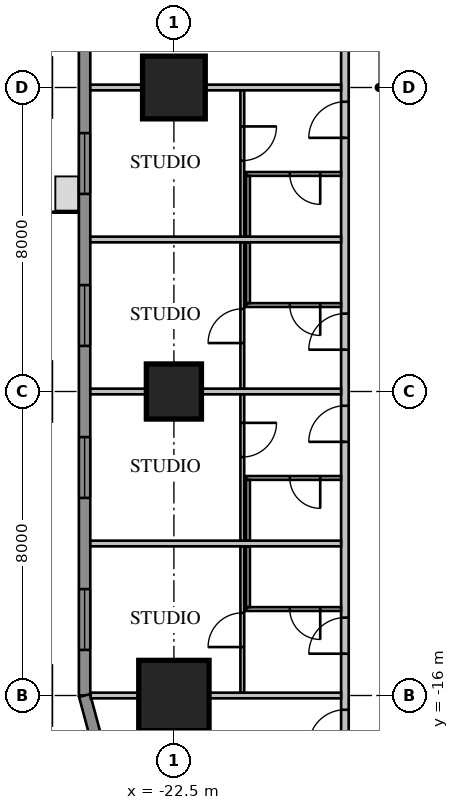
"""IFC4 building model, lengths in metres.
Left out: names, types, materials, properties, quantities, classifications, styles, units other than length and angle.
Written with IfcOpenShell. Run it as: python <this file> out.ifc"""

import sys

from ifc_helpers import new_model, si_unit, direction, frame, frame_2d, origin, origin_2d, place, context, subcontext, project, spatial, rectangle, extrude, element, fill, save


model = new_model("IFC4")
c1 = context("Model", 3, precision=1e-05, world=origin(), true_north=direction((0.0, 1.0)))
c2 = subcontext(c1, "Body", "Model", "MODEL_VIEW")
j1 = project(units=[si_unit("LENGTHUNIT", "METRE"), si_unit("PLANEANGLEUNIT", "RADIAN")], contexts=[c1])
p1 = place(None, origin())
s1 = spatial("IfcSite", under=j1, at=p1, CompositionType="ELEMENT")
p2 = place(p1, origin())
s2 = spatial("IfcBuilding", under=s1, at=p2, CompositionType="ELEMENT")
p3 = place(p2, frame((0.0, 0.0, 42.95)))
s3 = spatial("IfcBuildingStorey", under=s2, at=p3, CompositionType="ELEMENT", Elevation=42.95)
p4 = place(p3, frame((-22.5, 0.0, 0.0), z_axis=(0.0, 0.0, 1.0), x_axis=(1.0, 0.0, 0.0)))
e1 = element("IfcColumn", 1, at=p4, inside=s3, PredefinedType="COLUMN", context=c2, shape_type="SweptSolid", body=[
    extrude(rectangle(XDim=1.65, YDim=1.65, at=origin_2d()), origin(), (0.0, 0.0, 1.0), 3.85),
])
p5 = place(p3, frame((-22.5, -8.0, 0.0), z_axis=(0.0, 0.0, 1.0), x_axis=(1.0, 0.0, 0.0)))
e2 = element("IfcColumn", 2, at=p5, inside=s3, PredefinedType="COLUMN", context=c2, shape_type="SweptSolid", body=[
    extrude(rectangle(XDim=1.45, YDim=1.45, at=origin_2d()), origin(), (0.0, 0.0, 1.0), 3.85),
])
p6 = place(p3, frame((-22.5, -16.0, 0.0), z_axis=(0.0, 0.0, 1.0), x_axis=(1.0, 0.0, 0.0)))
e3 = element("IfcColumn", 3, at=p6, inside=s3, PredefinedType="COLUMN", context=c2, shape_type="SweptSolid", body=[
    extrude(rectangle(XDim=1.85, YDim=1.85, at=origin_2d()), origin(), (0.0, 0.0, 1.0), 3.85),
])
p7 = place(p3, frame((-24.85, 16.0, 0.0), z_axis=(0.0, 0.0, 1.0), x_axis=(0.0, -1.0, 0.0)))
e4 = element("IfcWall", 4, at=p7, inside=s3, PredefinedType="SOLIDWALL", context=c2, shape_type="SweptSolid", body=[
    extrude(rectangle(XDim=32.0, YDim=0.3, at=frame_2d((16.0, 0.0))), origin(), (0.0, 0.0, 1.0), 3.65),
])
p8 = place(p7, frame((1.2, 0.0, 0.75)))
e5 = element("IfcOpeningElement", 5, at=p8, cuts=e4, PredefinedType="OPENING", context=c2, shape_type="SweptSolid", body=[
    extrude(rectangle(XDim=1.6, YDim=1.8, at=frame_2d((0.8, 0.9))), frame((0.0, 0.17, 0.0), z_axis=(0.0, -1.0, 0.0), x_axis=(1.0, 0.0, 0.0)), (0.0, 0.0, 1.0), 0.34),
])
p9 = place(p7, frame((5.2, 0.0, 0.75)))
e6 = element("IfcOpeningElement", 6, at=p9, cuts=e4, PredefinedType="OPENING", context=c2, shape_type="SweptSolid", body=[
    extrude(rectangle(XDim=1.6, YDim=1.8, at=frame_2d((0.8, 0.9))), frame((0.0, 0.17, 0.0), z_axis=(0.0, -1.0, 0.0), x_axis=(1.0, 0.0, 0.0)), (0.0, 0.0, 1.0), 0.34),
])
p10 = place(p7, frame((17.2, 0.0, 0.75)))
e7 = element("IfcOpeningElement", 7, at=p10, cuts=e4, PredefinedType="OPENING", context=c2, shape_type="SweptSolid", body=[
    extrude(rectangle(XDim=1.6, YDim=1.8, at=frame_2d((0.8, 0.9))), frame((0.0, 0.17, 0.0), z_axis=(0.0, -1.0, 0.0), x_axis=(1.0, 0.0, 0.0)), (0.0, 0.0, 1.0), 0.34),
])
p11 = place(p7, frame((21.2, 0.0, 0.75)))
e8 = element("IfcOpeningElement", 8, at=p11, cuts=e4, PredefinedType="OPENING", context=c2, shape_type="SweptSolid", body=[
    extrude(rectangle(XDim=1.6, YDim=1.8, at=frame_2d((0.8, 0.9))), frame((0.0, 0.17, 0.0), z_axis=(0.0, -1.0, 0.0), x_axis=(1.0, 0.0, 0.0)), (0.0, 0.0, 1.0), 0.34),
])
p12 = place(p7, frame((25.2, 0.0, 0.75)))
e9 = element("IfcOpeningElement", 9, at=p12, cuts=e4, PredefinedType="OPENING", context=c2, shape_type="SweptSolid", body=[
    extrude(rectangle(XDim=1.6, YDim=1.8, at=frame_2d((0.8, 0.9))), frame((0.0, 0.17, 0.0), z_axis=(0.0, -1.0, 0.0), x_axis=(1.0, 0.0, 0.0)), (0.0, 0.0, 1.0), 0.34),
])
p13 = place(p7, frame((29.2, 0.0, 0.75)))
e10 = element("IfcOpeningElement", 10, at=p13, cuts=e4, PredefinedType="OPENING", context=c2, shape_type="SweptSolid", body=[
    extrude(rectangle(XDim=1.6, YDim=1.8, at=frame_2d((0.8, 0.9))), frame((0.0, 0.17, 0.0), z_axis=(0.0, -1.0, 0.0), x_axis=(1.0, 0.0, 0.0)), (0.0, 0.0, 1.0), 0.34),
])
p14 = place(p7, frame((8.8, 0.0, 0.75)))
e11 = element("IfcOpeningElement", 11, at=p14, cuts=e4, PredefinedType="OPENING", context=c2, shape_type="SweptSolid", body=[
    extrude(rectangle(XDim=2.4, YDim=1.8, at=frame_2d((1.2, 0.9))), frame((0.0, 0.17, 0.0), z_axis=(0.0, -1.0, 0.0), x_axis=(1.0, 0.0, 0.0)), (0.0, 0.0, 1.0), 0.34),
])
p15 = place(p7, frame((13.812, 0.0, 0.0)))
e12 = element("IfcOpeningElement", 12, at=p15, cuts=e4, PredefinedType="OPENING", context=c2, shape_type="SweptSolid", body=[
    extrude(rectangle(XDim=1.0, YDim=2.4, at=frame_2d((0.5, 1.2))), frame((0.0, 0.17, 0.0), z_axis=(0.0, -1.0, 0.0), x_axis=(1.0, 0.0, 0.0)), (0.0, 0.0, 1.0), 0.34),
])
p16 = place(p3, frame((-24.85, -16.0, 0.0), z_axis=(0.0, 0.0, 1.0), x_axis=(0.258839972501, -0.965920218567, 0.0)))
e13 = element("IfcWall", 13, at=p16, inside=s3, PredefinedType="SOLIDWALL", context=c2, shape_type="SweptSolid", body=[
    extrude(rectangle(XDim=4.581, YDim=0.3, at=frame_2d((2.291, 0.0))), origin(), (0.0, 0.0, 1.0), 3.65),
])
p17 = place(p3, frame((-18.0, 18.0, 0.0), z_axis=(0.0, 0.0, 1.0), x_axis=(0.0, -1.0, 0.0)))
e14 = element("IfcWall", 14, at=p17, inside=s3, PredefinedType="PARTITIONING", context=c2, shape_type="SweptSolid", body=[
    extrude(rectangle(XDim=36.0, YDim=0.2, at=frame_2d((18.0, 0.0))), origin(), (0.0, 0.0, 1.0), 3.65),
])
p18 = place(p17, frame((0.375, 0.0, 0.0)))
e15 = element("IfcOpeningElement", 15, at=p18, cuts=e14, PredefinedType="OPENING", context=c2, shape_type="SweptSolid", body=[
    extrude(rectangle(XDim=1.0, YDim=2.1, at=frame_2d((0.5, 1.05))), frame((0.0, 0.12, 0.0), z_axis=(0.0, -1.0, 0.0), x_axis=(1.0, 0.0, 0.0)), (0.0, 0.0, 1.0), 0.24),
])
p19 = place(p17, frame((2.375, 0.0, 0.0)))
e16 = element("IfcOpeningElement", 16, at=p19, cuts=e14, PredefinedType="OPENING", context=c2, shape_type="SweptSolid", body=[
    extrude(rectangle(XDim=0.95, YDim=2.1, at=frame_2d((0.475, 1.05))), frame((0.0, 0.12, 0.0), z_axis=(0.0, -1.0, 0.0), x_axis=(1.0, 0.0, 0.0)), (0.0, 0.0, 1.0), 0.24),
])
p20 = place(p17, frame((7.95, 0.0, 0.0)))
e17 = element("IfcOpeningElement", 17, at=p20, cuts=e14, PredefinedType="OPENING", context=c2, shape_type="SweptSolid", body=[
    extrude(rectangle(XDim=0.95, YDim=2.1, at=frame_2d((0.475, 1.05))), frame((0.0, 0.12, 0.0), z_axis=(0.0, -1.0, 0.0), x_axis=(1.0, 0.0, 0.0)), (0.0, 0.0, 1.0), 0.24),
])
p21 = place(p17, frame((18.375, 0.0, 0.0)))
e18 = element("IfcOpeningElement", 18, at=p21, cuts=e14, PredefinedType="OPENING", context=c2, shape_type="SweptSolid", body=[
    extrude(rectangle(XDim=0.95, YDim=2.1, at=frame_2d((0.475, 1.05))), frame((0.0, 0.12, 0.0), z_axis=(0.0, -1.0, 0.0), x_axis=(1.0, 0.0, 0.0)), (0.0, 0.0, 1.0), 0.24),
])
p22 = place(p17, frame((23.95, 0.0, 0.0)))
e19 = element("IfcOpeningElement", 19, at=p22, cuts=e14, PredefinedType="OPENING", context=c2, shape_type="SweptSolid", body=[
    extrude(rectangle(XDim=0.95, YDim=2.1, at=frame_2d((0.475, 1.05))), frame((0.0, 0.12, 0.0), z_axis=(0.0, -1.0, 0.0), x_axis=(1.0, 0.0, 0.0)), (0.0, 0.0, 1.0), 0.24),
])
p23 = place(p17, frame((26.375, 0.0, 0.0)))
e20 = element("IfcOpeningElement", 20, at=p23, cuts=e14, PredefinedType="OPENING", context=c2, shape_type="SweptSolid", body=[
    extrude(rectangle(XDim=0.95, YDim=2.1, at=frame_2d((0.475, 1.05))), frame((0.0, 0.12, 0.0), z_axis=(0.0, -1.0, 0.0), x_axis=(1.0, 0.0, 0.0)), (0.0, 0.0, 1.0), 0.24),
])
p24 = place(p17, frame((31.95, 0.0, 0.0)))
e21 = element("IfcOpeningElement", 21, at=p24, cuts=e14, PredefinedType="OPENING", context=c2, shape_type="SweptSolid", body=[
    extrude(rectangle(XDim=0.95, YDim=2.1, at=frame_2d((0.475, 1.05))), frame((0.0, 0.12, 0.0), z_axis=(0.0, -1.0, 0.0), x_axis=(1.0, 0.0, 0.0)), (0.0, 0.0, 1.0), 0.24),
])
p25 = place(p17, frame((34.375, 0.0, 0.0)))
e22 = element("IfcOpeningElement", 22, at=p25, cuts=e14, PredefinedType="OPENING", context=c2, shape_type="SweptSolid", body=[
    extrude(rectangle(XDim=0.95, YDim=2.1, at=frame_2d((0.475, 1.05))), frame((0.0, 0.12, 0.0), z_axis=(0.0, -1.0, 0.0), x_axis=(1.0, 0.0, 0.0)), (0.0, 0.0, 1.0), 0.24),
])
p26 = place(p17, frame((11.2, 0.0, 0.0)))
e23 = element("IfcOpeningElement", 23, at=p26, cuts=e14, PredefinedType="OPENING", context=c2, shape_type="SweptSolid", body=[
    extrude(rectangle(XDim=1.0, YDim=2.1, at=frame_2d((0.5, 1.05))), frame((0.0, 0.12, 0.0), z_axis=(0.0, -1.0, 0.0), x_axis=(1.0, 0.0, 0.0)), (0.0, 0.0, 1.0), 0.24),
])
p27 = place(p3, frame((-18.1, 0.0, 0.0), z_axis=(0.0, 0.0, 1.0), x_axis=(-1.0, 0.0, 0.0)))
e24 = element("IfcWall", 24, at=p27, inside=s3, PredefinedType="PARTITIONING", context=c2, shape_type="SweptSolid", body=[
    extrude(rectangle(XDim=6.6, YDim=0.15, at=frame_2d((3.3, 0.0))), origin(), (0.0, 0.0, 1.0), 2.957),
])
for number, where, z_axis, x_axis in (
    (25, (-18.1, -4.0, 0.0), (0.0, 0.0, 1.0), (-1.0, 0.0, 0.0)),
    (26, (-18.1, -8.0, 0.0), (0.0, 0.0, 1.0), (-1.0, 0.0, 0.0)),
    (27, (-18.1, -12.0, 0.0), (0.0, 0.0, 1.0), (-1.0, 0.0, 0.0)),
):
    element("IfcWall", number, at=place(p3, frame(where, z_axis=z_axis, x_axis=x_axis)), inside=s3, PredefinedType="PARTITIONING", context=c2, shape_type="SweptSolid", body=[
        extrude(rectangle(XDim=6.6, YDim=0.15, at=frame_2d((3.3, 0.0))), origin(), (0.0, 0.0, 1.0), 3.65),
    ])
p28 = place(p3, frame((-18.1, -16.0, 0.0), z_axis=(0.0, 0.0, 1.0), x_axis=(-1.0, 0.0, 0.0)))
e28 = element("IfcWall", 28, at=p28, inside=s3, PredefinedType="PARTITIONING", context=c2, shape_type="SweptSolid", body=[
    extrude(rectangle(XDim=6.589, YDim=0.15, at=frame_2d((3.295, 0.0))), origin(), (0.0, 0.0, 1.0), 3.65),
])
p29 = place(p3, frame((-18.1, -2.275, 0.0), z_axis=(0.0, 0.0, 1.0), x_axis=(-1.0, 0.0, 0.0)))
e29 = element("IfcWall", 29, at=p29, inside=s3, PredefinedType="PARTITIONING", context=c2, shape_type="SweptSolid", body=[
    extrude(rectangle(XDim=2.5, YDim=0.1, at=frame_2d((1.25, 0.0))), origin(), (0.0, 0.0, 1.0), 3.65),
])
p30 = place(p29, frame((0.55, 0.0, 0.0)))
e30 = element("IfcOpeningElement", 30, at=p30, cuts=e29, PredefinedType="OPENING", context=c2, shape_type="SweptSolid", body=[
    extrude(rectangle(XDim=0.8, YDim=2.1, at=frame_2d((0.4, 1.05))), frame((0.0, 0.07, 0.0), z_axis=(0.0, -1.0, 0.0), x_axis=(1.0, 0.0, 0.0)), (0.0, 0.0, 1.0), 0.14),
])
p31 = place(p3, frame((-20.55, -2.325, 0.0), z_axis=(0.0, 0.0, 1.0), x_axis=(0.0, -1.0, 0.0)))
e31 = element("IfcWall", 31, at=p31, inside=s3, PredefinedType="PARTITIONING", context=c2, shape_type="SweptSolid", body=[
    extrude(rectangle(XDim=1.6, YDim=0.1, at=frame_2d((0.8, 0.0))), origin(), (0.0, 0.0, 1.0), 3.65),
])
p32 = place(p3, frame((-18.1, -5.725, 0.0), z_axis=(0.0, 0.0, 1.0), x_axis=(-1.0, 0.0, 0.0)))
e32 = element("IfcWall", 32, at=p32, inside=s3, PredefinedType="PARTITIONING", context=c2, shape_type="SweptSolid", body=[
    extrude(rectangle(XDim=2.5, YDim=0.1, at=frame_2d((1.25, 0.0))), origin(), (0.0, 0.0, 1.0), 3.65),
])
p33 = place(p32, frame((0.55, 0.0, 0.0)))
e33 = element("IfcOpeningElement", 33, at=p33, cuts=e32, PredefinedType="OPENING", context=c2, shape_type="SweptSolid", body=[
    extrude(rectangle(XDim=0.8, YDim=2.1, at=frame_2d((0.4, 1.05))), frame((0.0, 0.07, 0.0), z_axis=(0.0, -1.0, 0.0), x_axis=(1.0, 0.0, 0.0)), (0.0, 0.0, 1.0), 0.14),
])
p34 = place(p3, frame((-20.55, -4.075, 0.0), z_axis=(0.0, 0.0, 1.0), x_axis=(0.0, -1.0, 0.0)))
e34 = element("IfcWall", 34, at=p34, inside=s3, PredefinedType="PARTITIONING", context=c2, shape_type="SweptSolid", body=[
    extrude(rectangle(XDim=1.6, YDim=0.1, at=frame_2d((0.8, 0.0))), origin(), (0.0, 0.0, 1.0), 3.65),
])
p35 = place(p3, frame((-18.1, -10.275, 0.0), z_axis=(0.0, 0.0, 1.0), x_axis=(-1.0, 0.0, 0.0)))
e35 = element("IfcWall", 35, at=p35, inside=s3, PredefinedType="PARTITIONING", context=c2, shape_type="SweptSolid", body=[
    extrude(rectangle(XDim=2.5, YDim=0.1, at=frame_2d((1.25, 0.0))), origin(), (0.0, 0.0, 1.0), 3.65),
])
p36 = place(p35, frame((0.55, 0.0, 0.0)))
e36 = element("IfcOpeningElement", 36, at=p36, cuts=e35, PredefinedType="OPENING", context=c2, shape_type="SweptSolid", body=[
    extrude(rectangle(XDim=0.8, YDim=2.1, at=frame_2d((0.4, 1.05))), frame((0.0, 0.07, 0.0), z_axis=(0.0, -1.0, 0.0), x_axis=(1.0, 0.0, 0.0)), (0.0, 0.0, 1.0), 0.14),
])
p37 = place(p3, frame((-20.55, -10.325, 0.0), z_axis=(0.0, 0.0, 1.0), x_axis=(0.0, -1.0, 0.0)))
e37 = element("IfcWall", 37, at=p37, inside=s3, PredefinedType="PARTITIONING", context=c2, shape_type="SweptSolid", body=[
    extrude(rectangle(XDim=1.6, YDim=0.1, at=frame_2d((0.8, 0.0))), origin(), (0.0, 0.0, 1.0), 3.65),
])
p38 = place(p3, frame((-18.1, -13.725, 0.0), z_axis=(0.0, 0.0, 1.0), x_axis=(-1.0, 0.0, 0.0)))
e38 = element("IfcWall", 38, at=p38, inside=s3, PredefinedType="PARTITIONING", context=c2, shape_type="SweptSolid", body=[
    extrude(rectangle(XDim=2.5, YDim=0.1, at=frame_2d((1.25, 0.0))), origin(), (0.0, 0.0, 1.0), 3.65),
])
p39 = place(p38, frame((0.55, 0.0, 0.0)))
e39 = element("IfcOpeningElement", 39, at=p39, cuts=e38, PredefinedType="OPENING", context=c2, shape_type="SweptSolid", body=[
    extrude(rectangle(XDim=0.8, YDim=2.1, at=frame_2d((0.4, 1.05))), frame((0.0, 0.07, 0.0), z_axis=(0.0, -1.0, 0.0), x_axis=(1.0, 0.0, 0.0)), (0.0, 0.0, 1.0), 0.14),
])
p40 = place(p3, frame((-20.55, -12.075, 0.0), z_axis=(0.0, 0.0, 1.0), x_axis=(0.0, -1.0, 0.0)))
e40 = element("IfcWall", 40, at=p40, inside=s3, PredefinedType="PARTITIONING", context=c2, shape_type="SweptSolid", body=[
    extrude(rectangle(XDim=1.6, YDim=0.1, at=frame_2d((0.8, 0.0))), origin(), (0.0, 0.0, 1.0), 3.65),
])
p41 = place(p3, frame((-20.7, -0.075, 0.0), z_axis=(0.0, 0.0, 1.0), x_axis=(0.0, -1.0, 0.0)))
e41 = element("IfcWall", 41, at=p41, inside=s3, PredefinedType="PARTITIONING", context=c2, shape_type="SweptSolid", body=[
    extrude(rectangle(XDim=3.85, YDim=0.1, at=frame_2d((1.925, 0.0))), origin(), (0.0, 0.0, 1.0), 3.65),
])
p42 = place(p41, frame((0.95, 0.0, 0.0)))
e42 = element("IfcOpeningElement", 42, at=p42, cuts=e41, PredefinedType="OPENING", context=c2, shape_type="SweptSolid", body=[
    extrude(rectangle(XDim=0.9, YDim=2.1, at=frame_2d((0.45, 1.05))), frame((0.0, 0.07, 0.0), z_axis=(0.0, -1.0, 0.0), x_axis=(1.0, 0.0, 0.0)), (0.0, 0.0, 1.0), 0.14),
])
p43 = place(p3, frame((-20.7, -4.075, 0.0), z_axis=(0.0, 0.0, 1.0), x_axis=(0.0, -1.0, 0.0)))
e43 = element("IfcWall", 43, at=p43, inside=s3, PredefinedType="PARTITIONING", context=c2, shape_type="SweptSolid", body=[
    extrude(rectangle(XDim=3.85, YDim=0.1, at=frame_2d((1.925, 0.0))), origin(), (0.0, 0.0, 1.0), 3.65),
])
p44 = place(p43, frame((1.75, 0.0, 0.0)))
e44 = element("IfcOpeningElement", 44, at=p44, cuts=e43, PredefinedType="OPENING", context=c2, shape_type="SweptSolid", body=[
    extrude(rectangle(XDim=0.9, YDim=2.1, at=frame_2d((0.45, 1.05))), frame((0.0, 0.07, 0.0), z_axis=(0.0, -1.0, 0.0), x_axis=(1.0, 0.0, 0.0)), (0.0, 0.0, 1.0), 0.14),
])
p45 = place(p3, frame((-20.7, -8.075, 0.0), z_axis=(0.0, 0.0, 1.0), x_axis=(0.0, -1.0, 0.0)))
e45 = element("IfcWall", 45, at=p45, inside=s3, PredefinedType="PARTITIONING", context=c2, shape_type="SweptSolid", body=[
    extrude(rectangle(XDim=3.85, YDim=0.1, at=frame_2d((1.925, 0.0))), origin(), (0.0, 0.0, 1.0), 3.65),
])
p46 = place(p45, frame((0.75, 0.0, 0.0)))
e46 = element("IfcOpeningElement", 46, at=p46, cuts=e45, PredefinedType="OPENING", context=c2, shape_type="SweptSolid", body=[
    extrude(rectangle(XDim=0.9, YDim=2.1, at=frame_2d((0.45, 1.05))), frame((0.0, 0.07, 0.0), z_axis=(0.0, -1.0, 0.0), x_axis=(1.0, 0.0, 0.0)), (0.0, 0.0, 1.0), 0.14),
])
p47 = place(p3, frame((-20.7, -12.075, 0.0), z_axis=(0.0, 0.0, 1.0), x_axis=(0.0, -1.0, 0.0)))
e47 = element("IfcWall", 47, at=p47, inside=s3, PredefinedType="PARTITIONING", context=c2, shape_type="SweptSolid", body=[
    extrude(rectangle(XDim=3.85, YDim=0.1, at=frame_2d((1.925, 0.0))), origin(), (0.0, 0.0, 1.0), 3.65),
])
p48 = place(p47, frame((1.75, 0.0, 0.0)))
e48 = element("IfcOpeningElement", 48, at=p48, cuts=e47, PredefinedType="OPENING", context=c2, shape_type="SweptSolid", body=[
    extrude(rectangle(XDim=0.9, YDim=2.1, at=frame_2d((0.45, 1.05))), frame((0.0, 0.07, 0.0), z_axis=(0.0, -1.0, 0.0), x_axis=(1.0, 0.0, 0.0)), (0.0, 0.0, 1.0), 0.14),
])
p49 = place(p10, origin())
e49 = element("IfcWindow", 49, at=p49, inside=s3, PartitioningType="SINGLE_PANEL", PredefinedType="WINDOW", context=c2, shape_type="SweptSolid", body=[
    extrude(rectangle(XDim=1.6, YDim=1.8, at=frame_2d((0.8, 0.9))), frame((0.0, 0.03, 0.0), z_axis=(0.0, -1.0, 0.0), x_axis=(1.0, 0.0, 0.0)), (0.0, 0.0, 1.0), 0.06),
])
fill(e7, e49)
p50 = place(p11, origin())
e50 = element("IfcWindow", 50, at=p50, inside=s3, PartitioningType="SINGLE_PANEL", PredefinedType="WINDOW", context=c2, shape_type="SweptSolid", body=[
    extrude(rectangle(XDim=1.6, YDim=1.8, at=frame_2d((0.8, 0.9))), frame((0.0, 0.03, 0.0), z_axis=(0.0, -1.0, 0.0), x_axis=(1.0, 0.0, 0.0)), (0.0, 0.0, 1.0), 0.06),
])
fill(e8, e50)
p51 = place(p12, origin())
e51 = element("IfcWindow", 51, at=p51, inside=s3, PartitioningType="SINGLE_PANEL", PredefinedType="WINDOW", context=c2, shape_type="SweptSolid", body=[
    extrude(rectangle(XDim=1.6, YDim=1.8, at=frame_2d((0.8, 0.9))), frame((0.0, 0.03, 0.0), z_axis=(0.0, -1.0, 0.0), x_axis=(1.0, 0.0, 0.0)), (0.0, 0.0, 1.0), 0.06),
])
fill(e9, e51)
p52 = place(p13, origin())
e52 = element("IfcWindow", 52, at=p52, inside=s3, PartitioningType="SINGLE_PANEL", PredefinedType="WINDOW", context=c2, shape_type="SweptSolid", body=[
    extrude(rectangle(XDim=1.6, YDim=1.8, at=frame_2d((0.8, 0.9))), frame((0.0, 0.03, 0.0), z_axis=(0.0, -1.0, 0.0), x_axis=(1.0, 0.0, 0.0)), (0.0, 0.0, 1.0), 0.06),
])
fill(e10, e52)
p53 = place(p21, origin())
e53 = element("IfcDoor", 53, at=p53, inside=s3, OperationType="SINGLE_SWING_RIGHT", PredefinedType="DOOR", context=c2, shape_type="SweptSolid", body=[
    extrude(rectangle(XDim=0.95, YDim=2.1, at=frame_2d((0.475, 1.05))), frame((0.0, 0.025, 0.0), z_axis=(0.0, -1.0, 0.0), x_axis=(1.0, 0.0, 0.0)), (0.0, 0.0, 1.0), 0.05),
])
fill(e18, e53)
p54 = place(p30, origin())
e54 = element("IfcDoor", 54, at=p54, inside=s3, OperationType="SINGLE_SWING_LEFT", PredefinedType="DOOR", context=c2, shape_type="SweptSolid", body=[
    extrude(rectangle(XDim=0.8, YDim=2.1, at=frame_2d((0.4, 1.05))), frame((0.0, 0.025, 0.0), z_axis=(0.0, -1.0, 0.0), x_axis=(1.0, 0.0, 0.0)), (0.0, 0.0, 1.0), 0.05),
])
fill(e30, e54)
p55 = place(p22, origin())
e55 = element("IfcDoor", 55, at=p55, inside=s3, OperationType="SINGLE_SWING_RIGHT", PredefinedType="DOOR", context=c2, shape_type="SweptSolid", body=[
    extrude(rectangle(XDim=0.95, YDim=2.1, at=frame_2d((0.475, 1.05))), frame((0.0, 0.025, 0.0), z_axis=(0.0, -1.0, 0.0), x_axis=(1.0, 0.0, 0.0)), (0.0, 0.0, 1.0), 0.05),
])
fill(e19, e55)
p56 = place(p33, origin())
e56 = element("IfcDoor", 56, at=p56, inside=s3, OperationType="SINGLE_SWING_LEFT", PredefinedType="DOOR", context=c2, shape_type="SweptSolid", body=[
    extrude(rectangle(XDim=0.8, YDim=2.1, at=frame_2d((0.4, 1.05))), frame((0.0, 0.025, 0.0), z_axis=(0.0, -1.0, 0.0), x_axis=(1.0, 0.0, 0.0)), (0.0, 0.0, 1.0), 0.05),
])
fill(e33, e56)
p57 = place(p23, origin())
e57 = element("IfcDoor", 57, at=p57, inside=s3, OperationType="SINGLE_SWING_RIGHT", PredefinedType="DOOR", context=c2, shape_type="SweptSolid", body=[
    extrude(rectangle(XDim=0.95, YDim=2.1, at=frame_2d((0.475, 1.05))), frame((0.0, 0.025, 0.0), z_axis=(0.0, -1.0, 0.0), x_axis=(1.0, 0.0, 0.0)), (0.0, 0.0, 1.0), 0.05),
])
fill(e20, e57)
p58 = place(p36, origin())
e58 = element("IfcDoor", 58, at=p58, inside=s3, OperationType="SINGLE_SWING_LEFT", PredefinedType="DOOR", context=c2, shape_type="SweptSolid", body=[
    extrude(rectangle(XDim=0.8, YDim=2.1, at=frame_2d((0.4, 1.05))), frame((0.0, 0.025, 0.0), z_axis=(0.0, -1.0, 0.0), x_axis=(1.0, 0.0, 0.0)), (0.0, 0.0, 1.0), 0.05),
])
fill(e36, e58)
p59 = place(p24, origin())
e59 = element("IfcDoor", 59, at=p59, inside=s3, OperationType="SINGLE_SWING_RIGHT", PredefinedType="DOOR", context=c2, shape_type="SweptSolid", body=[
    extrude(rectangle(XDim=0.95, YDim=2.1, at=frame_2d((0.475, 1.05))), frame((0.0, 0.025, 0.0), z_axis=(0.0, -1.0, 0.0), x_axis=(1.0, 0.0, 0.0)), (0.0, 0.0, 1.0), 0.05),
])
fill(e21, e59)
p60 = place(p39, origin())
e60 = element("IfcDoor", 60, at=p60, inside=s3, OperationType="SINGLE_SWING_LEFT", PredefinedType="DOOR", context=c2, shape_type="SweptSolid", body=[
    extrude(rectangle(XDim=0.8, YDim=2.1, at=frame_2d((0.4, 1.05))), frame((0.0, 0.025, 0.0), z_axis=(0.0, -1.0, 0.0), x_axis=(1.0, 0.0, 0.0)), (0.0, 0.0, 1.0), 0.05),
])
fill(e39, e60)
p61 = place(p25, origin())
e61 = element("IfcDoor", 61, at=p61, inside=s3, OperationType="SINGLE_SWING_RIGHT", PredefinedType="DOOR", context=c2, shape_type="SweptSolid", body=[
    extrude(rectangle(XDim=0.95, YDim=2.1, at=frame_2d((0.475, 1.05))), frame((0.0, 0.025, 0.0), z_axis=(0.0, -1.0, 0.0), x_axis=(1.0, 0.0, 0.0)), (0.0, 0.0, 1.0), 0.05),
])
fill(e22, e61)
p62 = place(p42, origin())
e62 = element("IfcDoor", 62, at=p62, inside=s3, OperationType="SINGLE_SWING_LEFT", PredefinedType="DOOR", context=c2, shape_type="SweptSolid", body=[
    extrude(rectangle(XDim=0.9, YDim=2.1, at=frame_2d((0.45, 1.05))), frame((0.0, 0.025, 0.0), z_axis=(0.0, -1.0, 0.0), x_axis=(1.0, 0.0, 0.0)), (0.0, 0.0, 1.0), 0.05),
])
fill(e42, e62)
p63 = place(p44, origin())
e63 = element("IfcDoor", 63, at=p63, inside=s3, OperationType="SINGLE_SWING_RIGHT", PredefinedType="DOOR", context=c2, shape_type="SweptSolid", body=[
    extrude(rectangle(XDim=0.9, YDim=2.1, at=frame_2d((0.45, 1.05))), frame((0.0, 0.025, 0.0), z_axis=(0.0, -1.0, 0.0), x_axis=(1.0, 0.0, 0.0)), (0.0, 0.0, 1.0), 0.05),
])
fill(e44, e63)
p64 = place(p46, origin())
e64 = element("IfcDoor", 64, at=p64, inside=s3, OperationType="SINGLE_SWING_LEFT", PredefinedType="DOOR", context=c2, shape_type="SweptSolid", body=[
    extrude(rectangle(XDim=0.9, YDim=2.1, at=frame_2d((0.45, 1.05))), frame((0.0, 0.025, 0.0), z_axis=(0.0, -1.0, 0.0), x_axis=(1.0, 0.0, 0.0)), (0.0, 0.0, 1.0), 0.05),
])
fill(e46, e64)
p65 = place(p48, origin())
e65 = element("IfcDoor", 65, at=p65, inside=s3, OperationType="SINGLE_SWING_RIGHT", PredefinedType="DOOR", context=c2, shape_type="SweptSolid", body=[
    extrude(rectangle(XDim=0.9, YDim=2.1, at=frame_2d((0.45, 1.05))), frame((0.0, 0.025, 0.0), z_axis=(0.0, -1.0, 0.0), x_axis=(1.0, 0.0, 0.0)), (0.0, 0.0, 1.0), 0.05),
])
fill(e48, e65)
save(model, sys.argv[1])
